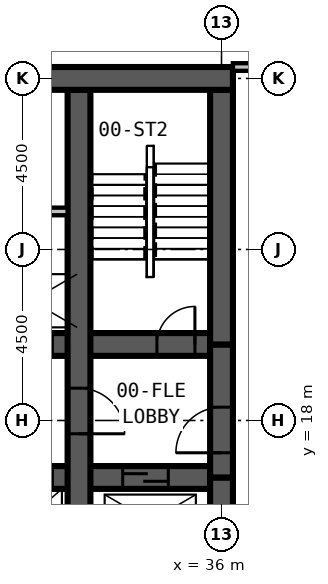
"""IFC4 building model, lengths in metres.
Left out: names, types, materials, properties, quantities, classifications, styles, units other than length and angle.
Written with IfcOpenShell. Run it as: python <this file> out.ifc"""

import sys

from ifc_helpers import new_model, si_unit, direction, frame, frame_2d, origin, place, context, subcontext, project, spatial, rectangle, extrude, element, fill, save


model = new_model("IFC4")
c1 = context("Model", 3, precision=1e-05, world=origin(), true_north=direction((0.0, 1.0)))
c2 = subcontext(c1, "Body", "Model", "MODEL_VIEW")
j1 = project(units=[si_unit("LENGTHUNIT", "METRE"), si_unit("PLANEANGLEUNIT", "RADIAN")], contexts=[c1])
p1 = place(None, origin())
s1 = spatial("IfcSite", under=j1, at=p1, CompositionType="ELEMENT")
p2 = place(p1, origin())
s2 = spatial("IfcBuilding", under=s1, at=p2, CompositionType="ELEMENT")
p3 = place(p2, origin())
s3 = spatial("IfcBuildingStorey", under=s2, at=p3, CompositionType="ELEMENT", Elevation=0.0)
p4 = place(p3, frame((36.3, 27.0, 0.0), z_axis=(0.0, 0.0, 1.0), x_axis=(-1.0, 0.0, 0.0)))
e1 = element("IfcWall", 1, at=p4, inside=s3, PredefinedType="SHEAR", context=c2, shape_type="SweptSolid", body=[
    extrude(rectangle(XDim=23.1, YDim=0.6, at=frame_2d((11.55, 0.0))), origin(), (0.0, 0.0, 1.0), 6.0),
])
p5 = place(p4, frame((17.05, 0.0, 0.0)))
e2 = element("IfcOpeningElement", 2, at=p5, cuts=e1, PredefinedType="OPENING", context=c2, shape_type="SweptSolid", body=[
    extrude(rectangle(XDim=1.0, YDim=2.1, at=frame_2d((0.5, 1.05))), frame((0.0, 0.31, 0.0), z_axis=(0.0, -1.0, 0.0), x_axis=(1.0, 0.0, 0.0)), (0.0, 0.0, 1.0), 0.62),
])
p6 = place(p4, frame((13.05, 0.0, 0.0), z_axis=(0.0, 0.0, 1.0), x_axis=(-1.0, 0.0, 0.0)))
e3 = element("IfcOpeningElement", 3, at=p6, cuts=e1, PredefinedType="OPENING", context=c2, shape_type="SweptSolid", body=[
    extrude(rectangle(XDim=1.0, YDim=2.1, at=frame_2d((0.5, 1.05))), frame((0.0, 0.31, 0.0), z_axis=(0.0, -1.0, 0.0), x_axis=(1.0, 0.0, 0.0)), (0.0, 0.0, 1.0), 0.62),
])
p7 = place(p4, frame((7.05, 0.0, 0.0)))
e4 = element("IfcOpeningElement", 4, at=p7, cuts=e1, PredefinedType="OPENING", context=c2, shape_type="SweptSolid", body=[
    extrude(rectangle(XDim=1.0, YDim=2.1, at=frame_2d((0.5, 1.05))), frame((0.0, 0.31, 0.0), z_axis=(0.0, -1.0, 0.0), x_axis=(1.0, 0.0, 0.0)), (0.0, 0.0, 1.0), 0.62),
])
p8 = place(p3, frame((32.25, 13.8, 0.0), z_axis=(0.0, 0.0, 1.0), x_axis=(0.0, 1.0, 0.0)))
e5 = element("IfcWall", 5, at=p8, inside=s3, PredefinedType="SHEAR", context=c2, shape_type="SweptSolid", body=[
    extrude(rectangle(XDim=12.9, YDim=0.6, at=frame_2d((6.45, 0.0))), origin(), (0.0, 0.0, 1.0), 6.0),
])
p9 = place(p8, frame((5.05, 0.0, 0.0), z_axis=(0.0, 0.0, 1.0), x_axis=(-1.0, 0.0, 0.0)))
e6 = element("IfcOpeningElement", 6, at=p9, cuts=e5, PredefinedType="OPENING", context=c2, shape_type="SweptSolid", body=[
    extrude(rectangle(XDim=1.2, YDim=2.1, at=frame_2d((0.6, 1.05))), frame((0.0, 0.31, 0.0), z_axis=(0.0, -1.0, 0.0), x_axis=(1.0, 0.0, 0.0)), (0.0, 0.0, 1.0), 0.62),
])
p10 = place(p3, frame((13.8, 16.5, 0.0), z_axis=(0.0, 0.0, 1.0), x_axis=(1.0, 0.0, 0.0)))
e7 = element("IfcWall", 7, at=p10, inside=s3, PredefinedType="SHEAR", context=c2, shape_type="SweptSolid", body=[
    extrude(rectangle(XDim=21.9, YDim=0.6, at=frame_2d((10.95, 0.0))), origin(), (0.0, 0.0, 1.0), 6.0),
])
p11 = place(p10, frame((4.15, 0.0, 0.0)))
e8 = element("IfcOpeningElement", 8, at=p11, cuts=e7, PredefinedType="OPENING", context=c2, shape_type="SweptSolid", body=[
    extrude(rectangle(XDim=1.1, YDim=2.1, at=frame_2d((0.55, 1.05))), frame((0.0, 0.31, 0.0), z_axis=(0.0, -1.0, 0.0), x_axis=(1.0, 0.0, 0.0)), (0.0, 0.0, 1.0), 0.62),
])
p12 = place(p10, frame((6.65, 0.0, 0.0)))
e9 = element("IfcOpeningElement", 9, at=p12, cuts=e7, PredefinedType="OPENING", context=c2, shape_type="SweptSolid", body=[
    extrude(rectangle(XDim=1.1, YDim=2.1, at=frame_2d((0.55, 1.05))), frame((0.0, 0.31, 0.0), z_axis=(0.0, -1.0, 0.0), x_axis=(1.0, 0.0, 0.0)), (0.0, 0.0, 1.0), 0.62),
])
p13 = place(p10, frame((9.15, 0.0, 0.0)))
e10 = element("IfcOpeningElement", 10, at=p13, cuts=e7, PredefinedType="OPENING", context=c2, shape_type="SweptSolid", body=[
    extrude(rectangle(XDim=1.1, YDim=2.1, at=frame_2d((0.55, 1.05))), frame((0.0, 0.31, 0.0), z_axis=(0.0, -1.0, 0.0), x_axis=(1.0, 0.0, 0.0)), (0.0, 0.0, 1.0), 0.62),
])
p14 = place(p10, frame((11.65, 0.0, 0.0)))
e11 = element("IfcOpeningElement", 11, at=p14, cuts=e7, PredefinedType="OPENING", context=c2, shape_type="SweptSolid", body=[
    extrude(rectangle(XDim=1.1, YDim=2.1, at=frame_2d((0.55, 1.05))), frame((0.0, 0.31, 0.0), z_axis=(0.0, -1.0, 0.0), x_axis=(1.0, 0.0, 0.0)), (0.0, 0.0, 1.0), 0.62),
])
p15 = place(p10, frame((14.15, 0.0, 0.0)))
e12 = element("IfcOpeningElement", 12, at=p15, cuts=e7, PredefinedType="OPENING", context=c2, shape_type="SweptSolid", body=[
    extrude(rectangle(XDim=1.1, YDim=2.1, at=frame_2d((0.55, 1.05))), frame((0.0, 0.31, 0.0), z_axis=(0.0, -1.0, 0.0), x_axis=(1.0, 0.0, 0.0)), (0.0, 0.0, 1.0), 0.62),
])
p16 = place(p10, frame((16.65, 0.0, 0.0)))
e13 = element("IfcOpeningElement", 13, at=p16, cuts=e7, PredefinedType="OPENING", context=c2, shape_type="SweptSolid", body=[
    extrude(rectangle(XDim=1.1, YDim=2.1, at=frame_2d((0.55, 1.05))), frame((0.0, 0.31, 0.0), z_axis=(0.0, -1.0, 0.0), x_axis=(1.0, 0.0, 0.0)), (0.0, 0.0, 1.0), 0.62),
])
p17 = place(p10, frame((0.6, 0.0, 0.0)))
e14 = element("IfcOpeningElement", 14, at=p17, cuts=e7, PredefinedType="OPENING", context=c2, shape_type="SweptSolid", body=[
    extrude(rectangle(XDim=1.2, YDim=2.1, at=frame_2d((0.6, 1.05))), frame((0.0, 0.31, 0.0), z_axis=(0.0, -1.0, 0.0), x_axis=(1.0, 0.0, 0.0)), (0.0, 0.0, 1.0), 0.62),
])
p18 = place(p10, frame((19.6, 0.0, 0.0)))
e15 = element("IfcOpeningElement", 15, at=p18, cuts=e7, PredefinedType="OPENING", context=c2, shape_type="SweptSolid", body=[
    extrude(rectangle(XDim=1.2, YDim=2.1, at=frame_2d((0.6, 1.05))), frame((0.0, 0.31, 0.0), z_axis=(0.0, -1.0, 0.0), x_axis=(1.0, 0.0, 0.0)), (0.0, 0.0, 1.0), 0.62),
])
p19 = place(p3, frame((13.8, 20.0, 0.0), z_axis=(0.0, 0.0, 1.0), x_axis=(1.0, 0.0, 0.0)))
e16 = element("IfcWall", 16, at=p19, inside=s3, PredefinedType="SHEAR", context=c2, shape_type="SweptSolid", body=[
    extrude(rectangle(XDim=21.9, YDim=0.6, at=frame_2d((10.95, 0.0))), origin(), (0.0, 0.0, 1.0), 6.0),
])
p20 = place(p19, frame((0.5, 0.0, 0.0)))
e17 = element("IfcOpeningElement", 17, at=p20, cuts=e16, PredefinedType="OPENING", context=c2, shape_type="SweptSolid", body=[
    extrude(rectangle(XDim=1.0, YDim=2.1, at=frame_2d((0.5, 1.05))), frame((0.0, 0.31, 0.0), z_axis=(0.0, -1.0, 0.0), x_axis=(1.0, 0.0, 0.0)), (0.0, 0.0, 1.0), 0.62),
])
p21 = place(p19, frame((20.5, 0.0, 0.0)))
e18 = element("IfcOpeningElement", 18, at=p21, cuts=e16, PredefinedType="OPENING", context=c2, shape_type="SweptSolid", body=[
    extrude(rectangle(XDim=1.0, YDim=2.1, at=frame_2d((0.5, 1.05))), frame((0.0, 0.31, 0.0), z_axis=(0.0, -1.0, 0.0), x_axis=(1.0, 0.0, 0.0)), (0.0, 0.0, 1.0), 0.62),
])
p22 = place(p19, frame((4.15, 0.0, 0.0)))
e19 = element("IfcOpeningElement", 19, at=p22, cuts=e16, PredefinedType="OPENING", context=c2, shape_type="SweptSolid", body=[
    extrude(rectangle(XDim=1.1, YDim=2.1, at=frame_2d((0.55, 1.05))), frame((0.0, 0.31, 0.0), z_axis=(0.0, -1.0, 0.0), x_axis=(1.0, 0.0, 0.0)), (0.0, 0.0, 1.0), 0.62),
])
p23 = place(p19, frame((6.65, 0.0, 0.0)))
e20 = element("IfcOpeningElement", 20, at=p23, cuts=e16, PredefinedType="OPENING", context=c2, shape_type="SweptSolid", body=[
    extrude(rectangle(XDim=1.1, YDim=2.1, at=frame_2d((0.55, 1.05))), frame((0.0, 0.31, 0.0), z_axis=(0.0, -1.0, 0.0), x_axis=(1.0, 0.0, 0.0)), (0.0, 0.0, 1.0), 0.62),
])
p24 = place(p19, frame((16.65, 0.0, 0.0)))
e21 = element("IfcOpeningElement", 21, at=p24, cuts=e16, PredefinedType="OPENING", context=c2, shape_type="SweptSolid", body=[
    extrude(rectangle(XDim=1.1, YDim=2.1, at=frame_2d((0.55, 1.05))), frame((0.0, 0.31, 0.0), z_axis=(0.0, -1.0, 0.0), x_axis=(1.0, 0.0, 0.0)), (0.0, 0.0, 1.0), 0.62),
])
p25 = place(p3, frame((36.0, 13.8, 0.0), z_axis=(0.0, 0.0, 1.0), x_axis=(0.0, 1.0, 0.0)))
e22 = element("IfcWall", 22, at=p25, inside=s3, PredefinedType="SHEAR", context=c2, shape_type="SweptSolid", body=[
    extrude(rectangle(XDim=2.7, YDim=0.6, at=frame_2d((1.35, 0.0))), origin(), (0.0, 0.0, 1.0), 6.0),
])
p26 = place(p3, frame((36.0, 16.5, 0.0), z_axis=(0.0, 0.0, 1.0), x_axis=(0.0, 1.0, 0.0)))
e23 = element("IfcWall", 23, at=p26, inside=s3, PredefinedType="SHEAR", context=c2, shape_type="SweptSolid", body=[
    extrude(rectangle(XDim=3.5, YDim=0.6, at=frame_2d((1.75, 0.0))), origin(), (0.0, 0.0, 1.0), 6.0),
])
p27 = place(p26, frame((0.65, 0.0, 0.0)))
e24 = element("IfcOpeningElement", 24, at=p27, cuts=e23, PredefinedType="OPENING", context=c2, shape_type="SweptSolid", body=[
    extrude(rectangle(XDim=1.2, YDim=2.1, at=frame_2d((0.6, 1.05))), frame((0.0, 0.31, 0.0), z_axis=(0.0, -1.0, 0.0), x_axis=(1.0, 0.0, 0.0)), (0.0, 0.0, 1.0), 0.62),
])
p28 = place(p3, frame((36.0, 20.0, 0.0), z_axis=(0.0, 0.0, 1.0), x_axis=(0.0, 1.0, 0.0)))
e25 = element("IfcWall", 25, at=p28, inside=s3, PredefinedType="SHEAR", context=c2, shape_type="SweptSolid", body=[
    extrude(rectangle(XDim=6.7, YDim=0.6, at=frame_2d((3.35, 0.0))), origin(), (0.0, 0.0, 1.0), 6.0),
])
p29 = place(p3, frame((36.3, 27.3, 0.0), z_axis=(0.0, 0.0, 1.0), x_axis=(1.0, 0.0, 0.0)))
e26 = element("IfcWall", 26, at=p29, inside=s3, PredefinedType="PARTITIONING", context=c2, shape_type="SweptSolid", body=[
    extrude(rectangle(XDim=8.9, YDim=0.2, at=frame_2d((4.45, 0.0))), origin(), (0.0, 0.0, 1.0), 4.4),
])
p30 = place(p29, frame((2.5, 0.0, 0.0), z_axis=(0.0, 0.0, 1.0), x_axis=(-1.0, 0.0, 0.0)))
e27 = element("IfcOpeningElement", 27, at=p30, cuts=e26, PredefinedType="OPENING", context=c2, shape_type="SweptSolid", body=[
    extrude(rectangle(XDim=1.8, YDim=2.4, at=frame_2d((0.9, 1.2))), frame((0.0, 0.11, 0.0), z_axis=(0.0, -1.0, 0.0), x_axis=(1.0, 0.0, 0.0)), (0.0, 0.0, 1.0), 0.22),
])
p31 = place(p3, frame((17.55, 23.5, 0.0), z_axis=(0.0, 0.0, 1.0), x_axis=(1.0, 0.0, 0.0)))
e28 = element("IfcWall", 28, at=p31, inside=s3, PredefinedType="PARTITIONING", context=c2, shape_type="SweptSolid", body=[
    extrude(rectangle(XDim=14.4, YDim=0.2, at=frame_2d((7.2, 0.0))), origin(), (0.0, 0.0, 1.0), 5.7),
])
p32 = place(p31, frame((5.45, 0.0, 0.0)))
e29 = element("IfcOpeningElement", 29, at=p32, cuts=e28, PredefinedType="OPENING", context=c2, shape_type="SweptSolid", body=[
    extrude(rectangle(XDim=1.0, YDim=2.1, at=frame_2d((0.5, 1.05))), frame((0.0, 0.11, 0.0), z_axis=(0.0, -1.0, 0.0), x_axis=(1.0, 0.0, 0.0)), (0.0, 0.0, 1.0), 0.22),
])
p33 = place(p27, origin())
e30 = element("IfcDoor", 30, at=p33, inside=s3, OperationType="SINGLE_SWING_LEFT", PredefinedType="DOOR", context=c2, shape_type="SweptSolid", body=[
    extrude(rectangle(XDim=1.2, YDim=2.1, at=frame_2d((0.6, 1.05))), frame((0.0, 0.3, 0.0), z_axis=(0.0, -1.0, 0.0), x_axis=(1.0, 0.0, 0.0)), (0.0, 0.0, 1.0), 0.6),
])
fill(e24, e30)
p34 = place(p9, origin())
e31 = element("IfcDoor", 31, at=p34, inside=s3, OperationType="SINGLE_SWING_RIGHT", PredefinedType="DOOR", context=c2, shape_type="SweptSolid", body=[
    extrude(rectangle(XDim=1.2, YDim=2.1, at=frame_2d((0.6, 1.05))), frame((0.0, 0.3, 0.0), z_axis=(0.0, -1.0, 0.0), x_axis=(1.0, 0.0, 0.0)), (0.0, 0.0, 1.0), 0.6),
])
fill(e6, e31)
p35 = place(p21, origin())
e32 = element("IfcDoor", 32, at=p35, inside=s3, OperationType="SINGLE_SWING_RIGHT", PredefinedType="DOOR", context=c2, shape_type="SweptSolid", body=[
    extrude(rectangle(XDim=1.0, YDim=2.1, at=frame_2d((0.5, 1.05))), frame((0.0, 0.3, 0.0), z_axis=(0.0, -1.0, 0.0), x_axis=(1.0, 0.0, 0.0)), (0.0, 0.0, 1.0), 0.6),
])
fill(e18, e32)
p36 = place(p18, origin())
e33 = element("IfcDoor", 33, at=p36, inside=s3, OperationType="SLIDING_TO_LEFT", PredefinedType="DOOR", context=c2, shape_type="SweptSolid", body=[
    extrude(rectangle(XDim=1.2, YDim=2.1, at=frame_2d((0.6, 1.05))), frame((0.0, 0.3, 0.0), z_axis=(0.0, -1.0, 0.0), x_axis=(1.0, 0.0, 0.0)), (0.0, 0.0, 1.0), 0.6),
])
fill(e15, e33)
save(model, sys.argv[1])
